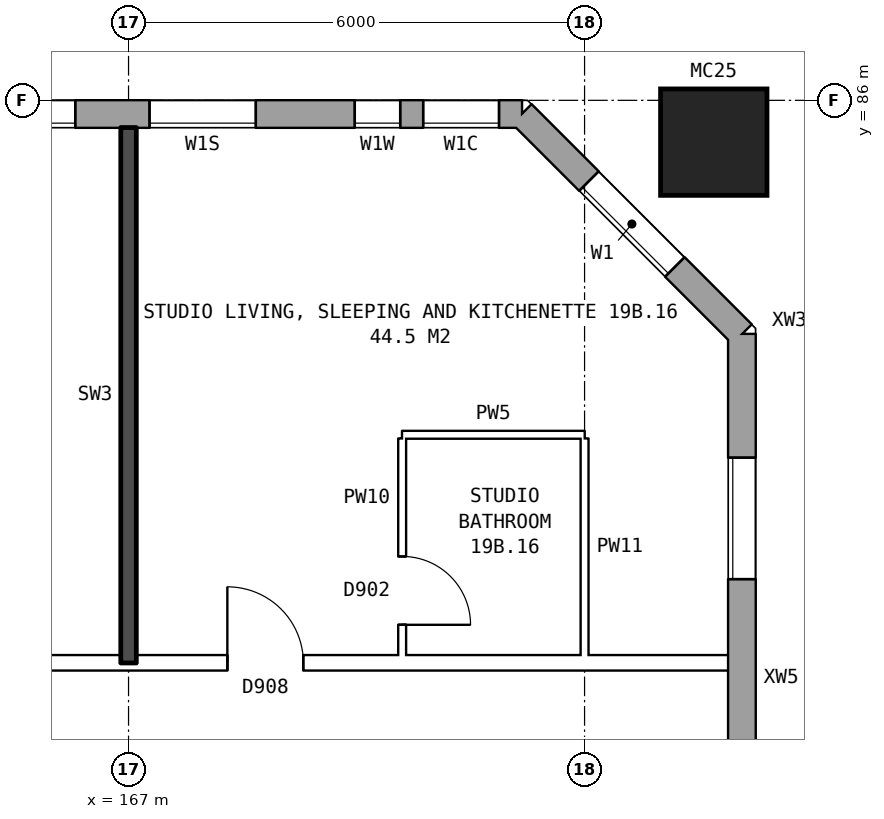
"""IFC4 building model, lengths in metres.
Left out: names, types, materials, properties, quantities, classifications, styles, units other than length and angle.
Written with IfcOpenShell. Run it as: python <this file> out.ifc"""

import sys

from ifc_helpers import new_model, si_unit, direction, frame, frame_2d, origin, origin_2d, place, context, subcontext, project, spatial, rectangle, hollow_rectangle, extrude, element, fill, save


model = new_model("IFC4")
c1 = context("Model", 3, precision=1e-05, world=origin(), true_north=direction((0.0, 1.0)))
c2 = subcontext(c1, "Body", "Model", "MODEL_VIEW")
j1 = project(units=[si_unit("LENGTHUNIT", "METRE"), si_unit("PLANEANGLEUNIT", "RADIAN")], contexts=[c1])
p1 = place(None, origin())
s1 = spatial("IfcSite", under=j1, at=p1, CompositionType="ELEMENT")
p2 = place(p1, origin())
s2 = spatial("IfcBuilding", under=s1, at=p2, CompositionType="ELEMENT")
p3 = place(p2, frame((0.0, 0.0, 71.6)))
s3 = spatial("IfcBuildingStorey", under=s2, at=p3, CompositionType="ELEMENT", Elevation=71.6)
p4 = place(p3, frame((174.7, 85.45, 0.0), z_axis=(0.0, 0.0, 1.0), x_axis=(1.0, 0.0, 0.0)))
e1 = element("IfcColumn", 1, at=p4, inside=s3, PredefinedType="COLUMN", context=c2, shape_type="SweptSolid", body=[
    extrude(hollow_rectangle(XDim=1.4, YDim=1.4, WallThickness=0.075, at=origin_2d()), origin(), (0.0, 0.0, 1.0), 3.1),
])
p5 = place(p3, frame((175.07, 57.075, 0.0), z_axis=(0.0, 0.0, 1.0), x_axis=(0.0, 1.0, 0.0)))
e2 = element("IfcWall", 2, at=p5, inside=s3, PredefinedType="STANDARD", context=c2, shape_type="SweptSolid", body=[
    extrude(rectangle(XDim=25.851, YDim=0.36, at=frame_2d((12.925, 0.0))), origin(), (0.0, 0.0, 1.0), 2.85),
])
p6 = place(p5, frame((1.625, 0.0, 0.8)))
e3 = element("IfcOpeningElement", 3, at=p6, cuts=e2, PredefinedType="OPENING", context=c2, shape_type="SweptSolid", body=[
    extrude(rectangle(XDim=1.6, YDim=1.8, at=frame_2d((0.8, 0.9))), frame((0.0, 0.19, 0.0), z_axis=(0.0, -1.0, 0.0), x_axis=(1.0, 0.0, 0.0)), (0.0, 0.0, 1.0), 0.38),
])
p7 = place(p5, frame((5.775, 0.0, 0.8)))
e4 = element("IfcOpeningElement", 4, at=p7, cuts=e2, PredefinedType="OPENING", context=c2, shape_type="SweptSolid", body=[
    extrude(rectangle(XDim=0.6, YDim=0.9, at=frame_2d((0.3, 0.45))), frame((0.0, 0.19, 0.0), z_axis=(0.0, -1.0, 0.0), x_axis=(1.0, 0.0, 0.0)), (0.0, 0.0, 1.0), 0.38),
])
p8 = place(p5, frame((7.625, 0.0, 0.8)))
e5 = element("IfcOpeningElement", 5, at=p8, cuts=e2, PredefinedType="OPENING", context=c2, shape_type="SweptSolid", body=[
    extrude(rectangle(XDim=1.6, YDim=1.8, at=frame_2d((0.8, 0.9))), frame((0.0, 0.19, 0.0), z_axis=(0.0, -1.0, 0.0), x_axis=(1.0, 0.0, 0.0)), (0.0, 0.0, 1.0), 0.38),
])
p9 = place(p5, frame((10.625, 0.0, 0.8)))
e6 = element("IfcOpeningElement", 6, at=p9, cuts=e2, PredefinedType="OPENING", context=c2, shape_type="SweptSolid", body=[
    extrude(rectangle(XDim=1.6, YDim=1.8, at=frame_2d((0.8, 0.9))), frame((0.0, 0.19, 0.0), z_axis=(0.0, -1.0, 0.0), x_axis=(1.0, 0.0, 0.0)), (0.0, 0.0, 1.0), 0.38),
])
p10 = place(p5, frame((13.625, 0.0, 0.8)))
e7 = element("IfcOpeningElement", 7, at=p10, cuts=e2, PredefinedType="OPENING", context=c2, shape_type="SweptSolid", body=[
    extrude(rectangle(XDim=1.6, YDim=1.8, at=frame_2d((0.8, 0.9))), frame((0.0, 0.19, 0.0), z_axis=(0.0, -1.0, 0.0), x_axis=(1.0, 0.0, 0.0)), (0.0, 0.0, 1.0), 0.38),
])
p11 = place(p5, frame((16.625, 0.0, 0.8)))
e8 = element("IfcOpeningElement", 8, at=p11, cuts=e2, PredefinedType="OPENING", context=c2, shape_type="SweptSolid", body=[
    extrude(rectangle(XDim=1.6, YDim=1.8, at=frame_2d((0.8, 0.9))), frame((0.0, 0.19, 0.0), z_axis=(0.0, -1.0, 0.0), x_axis=(1.0, 0.0, 0.0)), (0.0, 0.0, 1.0), 0.38),
])
p12 = place(p5, frame((6.675, 0.0, 0.8)))
e9 = element("IfcOpeningElement", 9, at=p12, cuts=e2, PredefinedType="OPENING", context=c2, shape_type="SweptSolid", body=[
    extrude(rectangle(XDim=0.6, YDim=1.5, at=frame_2d((0.3, 0.75))), frame((0.0, 0.19, 0.0), z_axis=(0.0, -1.0, 0.0), x_axis=(1.0, 0.0, 0.0)), (0.0, 0.0, 1.0), 0.38),
])
p13 = place(p5, frame((22.625, 0.0, 0.8)))
e10 = element("IfcOpeningElement", 10, at=p13, cuts=e2, PredefinedType="OPENING", context=c2, shape_type="SweptSolid", body=[
    extrude(rectangle(XDim=1.6, YDim=1.8, at=frame_2d((0.8, 0.9))), frame((0.0, 0.19, 0.0), z_axis=(0.0, -1.0, 0.0), x_axis=(1.0, 0.0, 0.0)), (0.0, 0.0, 1.0), 0.38),
])
p14 = place(p5, frame((9.525, 0.0, 0.8)))
e11 = element("IfcOpeningElement", 11, at=p14, cuts=e2, PredefinedType="OPENING", context=c2, shape_type="SweptSolid", body=[
    extrude(rectangle(XDim=0.8, YDim=1.8, at=frame_2d((0.4, 0.9))), frame((0.0, 0.19, 0.0), z_axis=(0.0, -1.0, 0.0), x_axis=(1.0, 0.0, 0.0)), (0.0, 0.0, 1.0), 0.38),
])
p15 = place(p5, frame((12.525, 0.0, 0.8)))
e12 = element("IfcOpeningElement", 12, at=p15, cuts=e2, PredefinedType="OPENING", context=c2, shape_type="SweptSolid", body=[
    extrude(rectangle(XDim=0.8, YDim=1.8, at=frame_2d((0.4, 0.9))), frame((0.0, 0.19, 0.0), z_axis=(0.0, -1.0, 0.0), x_axis=(1.0, 0.0, 0.0)), (0.0, 0.0, 1.0), 0.38),
])
p16 = place(p5, frame((15.525, 0.0, 0.8)))
e13 = element("IfcOpeningElement", 13, at=p16, cuts=e2, PredefinedType="OPENING", context=c2, shape_type="SweptSolid", body=[
    extrude(rectangle(XDim=0.8, YDim=1.8, at=frame_2d((0.4, 0.9))), frame((0.0, 0.19, 0.0), z_axis=(0.0, -1.0, 0.0), x_axis=(1.0, 0.0, 0.0)), (0.0, 0.0, 1.0), 0.38),
])
p17 = place(p5, frame((18.525, 0.0, 0.8)))
e14 = element("IfcOpeningElement", 14, at=p17, cuts=e2, PredefinedType="OPENING", context=c2, shape_type="SweptSolid", body=[
    extrude(rectangle(XDim=0.6, YDim=1.5, at=frame_2d((0.3, 0.75))), frame((0.0, 0.19, 0.0), z_axis=(0.0, -1.0, 0.0), x_axis=(1.0, 0.0, 0.0)), (0.0, 0.0, 1.0), 0.38),
])
p18 = place(p5, frame((19.425, 0.0, 0.8)))
e15 = element("IfcOpeningElement", 15, at=p18, cuts=e2, PredefinedType="OPENING", context=c2, shape_type="SweptSolid", body=[
    extrude(rectangle(XDim=0.6, YDim=0.9, at=frame_2d((0.3, 0.45))), frame((0.0, 0.19, 0.0), z_axis=(0.0, -1.0, 0.0), x_axis=(1.0, 0.0, 0.0)), (0.0, 0.0, 1.0), 0.38),
])
p19 = place(p3, frame((175.07, 82.925, 0.0), z_axis=(0.0, 0.0, 1.0), x_axis=(-0.707106781187, 0.707106781187, 0.0)))
e16 = element("IfcWall", 16, at=p19, inside=s3, PredefinedType="STANDARD", context=c2, shape_type="SweptSolid", body=[
    extrude(rectangle(XDim=4.094, YDim=0.36, at=frame_2d((2.047, 0.0))), origin(), (0.0, 0.0, 1.0), 2.85),
])
p20 = place(p19, frame((1.247, 0.0, 0.8)))
e17 = element("IfcOpeningElement", 17, at=p20, cuts=e16, PredefinedType="OPENING", context=c2, shape_type="SweptSolid", body=[
    extrude(rectangle(XDim=1.6, YDim=1.8, at=frame_2d((0.8, 0.9))), frame((0.0, 0.19, 0.0), z_axis=(0.0, -1.0, 0.0), x_axis=(1.0, 0.0, 0.0)), (0.0, 0.0, 1.0), 0.38),
])
p21 = place(p3, frame((172.175, 85.82, 0.0), z_axis=(0.0, 0.0, 1.0), x_axis=(-1.0, 0.0, 0.0)))
e18 = element("IfcWall", 18, at=p21, inside=s3, PredefinedType="STANDARD", context=c2, shape_type="SweptSolid", body=[
    extrude(rectangle(XDim=38.101, YDim=0.36, at=frame_2d((19.05, 0.0))), origin(), (0.0, 0.0, 1.0), 2.85),
])
p22 = place(p21, frame((0.3, 0.0, 0.8)))
e19 = element("IfcOpeningElement", 19, at=p22, cuts=e18, PredefinedType="OPENING", context=c2, shape_type="SweptSolid", body=[
    extrude(rectangle(XDim=1.0, YDim=1.8, at=frame_2d((0.5, 0.9))), frame((0.0, 0.19, 0.0), z_axis=(0.0, -1.0, 0.0), x_axis=(1.0, 0.0, 0.0)), (0.0, 0.0, 1.0), 0.38),
])
p23 = place(p21, frame((5.875, 0.0, 0.8)))
e20 = element("IfcOpeningElement", 20, at=p23, cuts=e18, PredefinedType="OPENING", context=c2, shape_type="SweptSolid", body=[
    extrude(rectangle(XDim=1.6, YDim=1.8, at=frame_2d((0.8, 0.9))), frame((0.0, 0.19, 0.0), z_axis=(0.0, -1.0, 0.0), x_axis=(1.0, 0.0, 0.0)), (0.0, 0.0, 1.0), 0.38),
])
p24 = place(p21, frame((8.875, 0.0, 0.8)))
e21 = element("IfcOpeningElement", 21, at=p24, cuts=e18, PredefinedType="OPENING", context=c2, shape_type="SweptSolid", body=[
    extrude(rectangle(XDim=1.6, YDim=1.8, at=frame_2d((0.8, 0.9))), frame((0.0, 0.19, 0.0), z_axis=(0.0, -1.0, 0.0), x_axis=(1.0, 0.0, 0.0)), (0.0, 0.0, 1.0), 0.38),
])
p25 = place(p21, frame((11.875, 0.0, 0.8)))
e22 = element("IfcOpeningElement", 22, at=p25, cuts=e18, PredefinedType="OPENING", context=c2, shape_type="SweptSolid", body=[
    extrude(rectangle(XDim=1.6, YDim=1.8, at=frame_2d((0.8, 0.9))), frame((0.0, 0.19, 0.0), z_axis=(0.0, -1.0, 0.0), x_axis=(1.0, 0.0, 0.0)), (0.0, 0.0, 1.0), 0.38),
])
p26 = place(p21, frame((14.875, 0.0, 0.8)))
e23 = element("IfcOpeningElement", 23, at=p26, cuts=e18, PredefinedType="OPENING", context=c2, shape_type="SweptSolid", body=[
    extrude(rectangle(XDim=1.6, YDim=1.8, at=frame_2d((0.8, 0.9))), frame((0.0, 0.19, 0.0), z_axis=(0.0, -1.0, 0.0), x_axis=(1.0, 0.0, 0.0)), (0.0, 0.0, 1.0), 0.38),
])
p27 = place(p21, frame((17.875, 0.0, 0.8)))
e24 = element("IfcOpeningElement", 24, at=p27, cuts=e18, PredefinedType="OPENING", context=c2, shape_type="SweptSolid", body=[
    extrude(rectangle(XDim=1.6, YDim=1.8, at=frame_2d((0.8, 0.9))), frame((0.0, 0.19, 0.0), z_axis=(0.0, -1.0, 0.0), x_axis=(1.0, 0.0, 0.0)), (0.0, 0.0, 1.0), 0.38),
])
p28 = place(p21, frame((20.875, 0.0, 0.8)))
e25 = element("IfcOpeningElement", 25, at=p28, cuts=e18, PredefinedType="OPENING", context=c2, shape_type="SweptSolid", body=[
    extrude(rectangle(XDim=1.6, YDim=1.8, at=frame_2d((0.8, 0.9))), frame((0.0, 0.19, 0.0), z_axis=(0.0, -1.0, 0.0), x_axis=(1.0, 0.0, 0.0)), (0.0, 0.0, 1.0), 0.38),
])
p29 = place(p21, frame((23.875, 0.0, 0.8)))
e26 = element("IfcOpeningElement", 26, at=p29, cuts=e18, PredefinedType="OPENING", context=c2, shape_type="SweptSolid", body=[
    extrude(rectangle(XDim=1.6, YDim=1.8, at=frame_2d((0.8, 0.9))), frame((0.0, 0.19, 0.0), z_axis=(0.0, -1.0, 0.0), x_axis=(1.0, 0.0, 0.0)), (0.0, 0.0, 1.0), 0.38),
])
p30 = place(p21, frame((26.875, 0.0, 0.8)))
e27 = element("IfcOpeningElement", 27, at=p30, cuts=e18, PredefinedType="OPENING", context=c2, shape_type="SweptSolid", body=[
    extrude(rectangle(XDim=1.6, YDim=1.8, at=frame_2d((0.8, 0.9))), frame((0.0, 0.19, 0.0), z_axis=(0.0, -1.0, 0.0), x_axis=(1.0, 0.0, 0.0)), (0.0, 0.0, 1.0), 0.38),
])
p31 = place(p21, frame((29.875, 0.0, 0.8)))
e28 = element("IfcOpeningElement", 28, at=p31, cuts=e18, PredefinedType="OPENING", context=c2, shape_type="SweptSolid", body=[
    extrude(rectangle(XDim=1.6, YDim=1.8, at=frame_2d((0.8, 0.9))), frame((0.0, 0.19, 0.0), z_axis=(0.0, -1.0, 0.0), x_axis=(1.0, 0.0, 0.0)), (0.0, 0.0, 1.0), 0.38),
])
p32 = place(p21, frame((31.775, 0.0, 0.8)))
e29 = element("IfcOpeningElement", 29, at=p32, cuts=e18, PredefinedType="OPENING", context=c2, shape_type="SweptSolid", body=[
    extrude(rectangle(XDim=1.6, YDim=1.8, at=frame_2d((0.8, 0.9))), frame((0.0, 0.19, 0.0), z_axis=(0.0, -1.0, 0.0), x_axis=(1.0, 0.0, 0.0)), (0.0, 0.0, 1.0), 0.38),
])
p33 = place(p21, frame((35.775, 0.0, 1.7)))
e30 = element("IfcOpeningElement", 30, at=p33, cuts=e18, PredefinedType="OPENING", context=c2, shape_type="SweptSolid", body=[
    extrude(rectangle(XDim=0.6, YDim=0.9, at=frame_2d((0.3, 0.45))), frame((0.0, 0.19, 0.0), z_axis=(0.0, -1.0, 0.0), x_axis=(1.0, 0.0, 0.0)), (0.0, 0.0, 1.0), 0.38),
])
p34 = place(p21, frame((1.6, 0.0, 1.6)))
e31 = element("IfcOpeningElement", 31, at=p34, cuts=e18, PredefinedType="OPENING", context=c2, shape_type="SweptSolid", body=[
    extrude(rectangle(XDim=0.6, YDim=0.9, at=frame_2d((0.3, 0.45))), frame((0.0, 0.19, 0.0), z_axis=(0.0, -1.0, 0.0), x_axis=(1.0, 0.0, 0.0)), (0.0, 0.0, 1.0), 0.38),
])
p35 = place(p21, frame((3.5, 0.0, 0.8)))
e32 = element("IfcOpeningElement", 32, at=p35, cuts=e18, PredefinedType="OPENING", context=c2, shape_type="SweptSolid", body=[
    extrude(rectangle(XDim=1.4, YDim=0.9, at=frame_2d((0.7, 0.45))), frame((0.0, 0.19, 0.0), z_axis=(0.0, -1.0, 0.0), x_axis=(1.0, 0.0, 0.0)), (0.0, 0.0, 1.0), 0.38),
])
p36 = place(p21, frame((33.675, 0.0, 0.8)))
e33 = element("IfcOpeningElement", 33, at=p36, cuts=e18, PredefinedType="OPENING", context=c2, shape_type="SweptSolid", body=[
    extrude(rectangle(XDim=0.6, YDim=1.2, at=frame_2d((0.3, 0.6))), frame((0.0, 0.19, 0.0), z_axis=(0.0, -1.0, 0.0), x_axis=(1.0, 0.0, 0.0)), (0.0, 0.0, 1.0), 0.38),
])
p37 = place(p21, frame((36.675, 0.0, 0.8)))
e34 = element("IfcOpeningElement", 34, at=p37, cuts=e18, PredefinedType="OPENING", context=c2, shape_type="SweptSolid", body=[
    extrude(rectangle(XDim=1.0, YDim=1.8, at=frame_2d((0.5, 0.9))), frame((0.0, 0.19, 0.0), z_axis=(0.0, -1.0, 0.0), x_axis=(1.0, 0.0, 0.0)), (0.0, 0.0, 1.0), 0.38),
])
p38 = place(p3, frame((155.1, 78.6, 0.0), z_axis=(0.0, 0.0, 1.0), x_axis=(1.0, 0.0, 0.0)))
e35 = element("IfcWall", 35, at=p38, inside=s3, PredefinedType="PARTITIONING", context=c2, shape_type="SweptSolid", body=[
    extrude(rectangle(XDim=19.79, YDim=0.2, at=frame_2d((9.895, 0.0))), origin(), (0.0, 0.0, 1.0), 2.85),
])
p39 = place(p38, frame((1.45, 0.0, 0.0)))
e36 = element("IfcOpeningElement", 36, at=p39, cuts=e35, PredefinedType="OPENING", context=c2, shape_type="SweptSolid", body=[
    extrude(rectangle(XDim=1.0, YDim=2.1, at=frame_2d((0.5, 1.05))), frame((0.0, 0.11, 0.0), z_axis=(0.0, -1.0, 0.0), x_axis=(1.0, 0.0, 0.0)), (0.0, 0.0, 1.0), 0.22),
])
p40 = place(p38, frame((9.6, 0.0, 0.0)))
e37 = element("IfcOpeningElement", 37, at=p40, cuts=e35, PredefinedType="OPENING", context=c2, shape_type="SweptSolid", body=[
    extrude(rectangle(XDim=1.0, YDim=2.1, at=frame_2d((0.5, 1.05))), frame((0.0, 0.11, 0.0), z_axis=(0.0, -1.0, 0.0), x_axis=(1.0, 0.0, 0.0)), (0.0, 0.0, 1.0), 0.22),
])
p41 = place(p38, frame((13.2, 0.0, 0.0)))
e38 = element("IfcOpeningElement", 38, at=p41, cuts=e35, PredefinedType="OPENING", context=c2, shape_type="SweptSolid", body=[
    extrude(rectangle(XDim=1.0, YDim=2.1, at=frame_2d((0.5, 1.05))), frame((0.0, 0.11, 0.0), z_axis=(0.0, -1.0, 0.0), x_axis=(1.0, 0.0, 0.0)), (0.0, 0.0, 1.0), 0.22),
])
p42 = place(p3, frame((170.6, 81.6, 0.0), z_axis=(0.0, 0.0, 1.0), x_axis=(1.0, 0.0, 0.0)))
e39 = element("IfcWall", 39, at=p42, inside=s3, PredefinedType="PARTITIONING", context=c2, shape_type="SweptSolid", body=[
    extrude(rectangle(XDim=2.4, YDim=0.1, at=frame_2d((1.2, 0.0))), origin(), (0.0, 0.0, 1.0), 2.85),
])
p43 = place(p3, frame((167.0, 78.6, 0.0), z_axis=(0.0, 0.0, 1.0), x_axis=(0.0, 1.0, 0.0)))
e40 = element("IfcWall", 40, at=p43, inside=s3, PredefinedType="SOLIDWALL", context=c2, shape_type="SweptSolid", body=[
    extrude(rectangle(XDim=7.04, YDim=0.2, at=frame_2d((3.52, 0.0))), origin(), (0.0, 0.0, 1.0), 2.85),
])
p44 = place(p3, frame((170.6, 78.7, 0.0), z_axis=(0.0, 0.0, 1.0), x_axis=(0.0, 1.0, 0.0)))
e41 = element("IfcWall", 41, at=p44, inside=s3, PredefinedType="PARTITIONING", context=c2, shape_type="SweptSolid", body=[
    extrude(rectangle(XDim=2.85, YDim=0.1, at=frame_2d((1.425, 0.0))), origin(), (0.0, 0.0, 1.0), 2.85),
])
p45 = place(p44, frame((0.4, 0.0, 0.0)))
e42 = element("IfcOpeningElement", 42, at=p45, cuts=e41, PredefinedType="OPENING", context=c2, shape_type="SweptSolid", body=[
    extrude(rectangle(XDim=0.9, YDim=2.1, at=frame_2d((0.45, 1.05))), frame((0.0, 0.06, 0.0), z_axis=(0.0, -1.0, 0.0), x_axis=(1.0, 0.0, 0.0)), (0.0, 0.0, 1.0), 0.12),
])
p46 = place(p3, frame((173.0, 78.7, 0.0), z_axis=(0.0, 0.0, 1.0), x_axis=(0.0, 1.0, 0.0)))
e43 = element("IfcWall", 43, at=p46, inside=s3, PredefinedType="PARTITIONING", context=c2, shape_type="SweptSolid", body=[
    extrude(rectangle(XDim=2.85, YDim=0.1, at=frame_2d((1.425, 0.0))), origin(), (0.0, 0.0, 1.0), 2.85),
])
p47 = place(p13, origin())
e44 = element("IfcWindow", 44, at=p47, inside=s3, PartitioningType="SINGLE_PANEL", PredefinedType="WINDOW", context=c2, shape_type="SweptSolid", body=[
    extrude(rectangle(XDim=1.6, YDim=1.8, at=frame_2d((0.8, 0.9))), frame((0.0, 0.15, 0.0), z_axis=(0.0, -1.0, 0.0), x_axis=(1.0, 0.0, 0.0)), (0.0, 0.0, 1.0), 0.06),
])
fill(e10, e44)
p48 = place(p20, origin())
e45 = element("IfcWindow", 45, at=p48, inside=s3, PartitioningType="SINGLE_PANEL", PredefinedType="WINDOW", context=c2, shape_type="SweptSolid", body=[
    extrude(rectangle(XDim=1.6, YDim=1.8, at=frame_2d((0.8, 0.9))), frame((0.0, 0.15, 0.0), z_axis=(0.0, -1.0, 0.0), x_axis=(1.0, 0.0, 0.0)), (0.0, 0.0, 1.0), 0.06),
])
fill(e17, e45)
p49 = place(p22, origin())
e46 = element("IfcWindow", 46, at=p49, inside=s3, PartitioningType="SINGLE_PANEL", PredefinedType="WINDOW", context=c2, shape_type="SweptSolid", body=[
    extrude(rectangle(XDim=1.0, YDim=1.8, at=frame_2d((0.5, 0.9))), frame((0.0, 0.15, 0.0), z_axis=(0.0, -1.0, 0.0), x_axis=(1.0, 0.0, 0.0)), (0.0, 0.0, 1.0), 0.06),
])
fill(e19, e46)
p50 = place(p23, origin())
e47 = element("IfcWindow", 47, at=p50, inside=s3, PartitioningType="SINGLE_PANEL", PredefinedType="WINDOW", context=c2, shape_type="SweptSolid", body=[
    extrude(rectangle(XDim=1.6, YDim=1.8, at=frame_2d((0.8, 0.9))), frame((0.0, 0.15, 0.0), z_axis=(0.0, -1.0, 0.0), x_axis=(1.0, 0.0, 0.0)), (0.0, 0.0, 1.0), 0.06),
])
fill(e20, e47)
p51 = place(p41, origin())
e48 = element("IfcDoor", 48, at=p51, inside=s3, OperationType="SINGLE_SWING_LEFT", PredefinedType="DOOR", context=c2, shape_type="SweptSolid", body=[
    extrude(rectangle(XDim=1.0, YDim=2.1, at=frame_2d((0.5, 1.05))), frame((0.0, 0.025, 0.0), z_axis=(0.0, -1.0, 0.0), x_axis=(1.0, 0.0, 0.0)), (0.0, 0.0, 1.0), 0.05),
])
fill(e38, e48)
p52 = place(p45, frame((0.9, 0.0, 0.0), z_axis=(0.0, 0.0, 1.0), x_axis=(-1.0, 0.0, 0.0)))
e49 = element("IfcDoor", 49, at=p52, inside=s3, OperationType="SINGLE_SWING_RIGHT", PredefinedType="DOOR", context=c2, shape_type="SweptSolid", body=[
    extrude(rectangle(XDim=0.9, YDim=2.1, at=frame_2d((0.45, 1.05))), frame((0.0, 0.025, 0.0), z_axis=(0.0, -1.0, 0.0), x_axis=(1.0, 0.0, 0.0)), (0.0, 0.0, 1.0), 0.05),
])
fill(e42, e49)
p53 = place(p34, origin())
e50 = element("IfcWindow", 50, at=p53, inside=s3, PartitioningType="SINGLE_PANEL", PredefinedType="WINDOW", context=c2, shape_type="SweptSolid", body=[
    extrude(rectangle(XDim=0.6, YDim=0.9, at=frame_2d((0.3, 0.45))), frame((0.0, 0.15, 0.0), z_axis=(0.0, -1.0, 0.0), x_axis=(1.0, 0.0, 0.0)), (0.0, 0.0, 1.0), 0.06),
])
fill(e31, e50)
p54 = place(p35, origin())
e51 = element("IfcWindow", 51, at=p54, inside=s3, PartitioningType="SINGLE_PANEL", PredefinedType="WINDOW", context=c2, shape_type="SweptSolid", body=[
    extrude(rectangle(XDim=1.4, YDim=0.9, at=frame_2d((0.7, 0.45))), frame((0.0, 0.15, 0.0), z_axis=(0.0, -1.0, 0.0), x_axis=(1.0, 0.0, 0.0)), (0.0, 0.0, 1.0), 0.06),
])
fill(e32, e51)
save(model, sys.argv[1])
